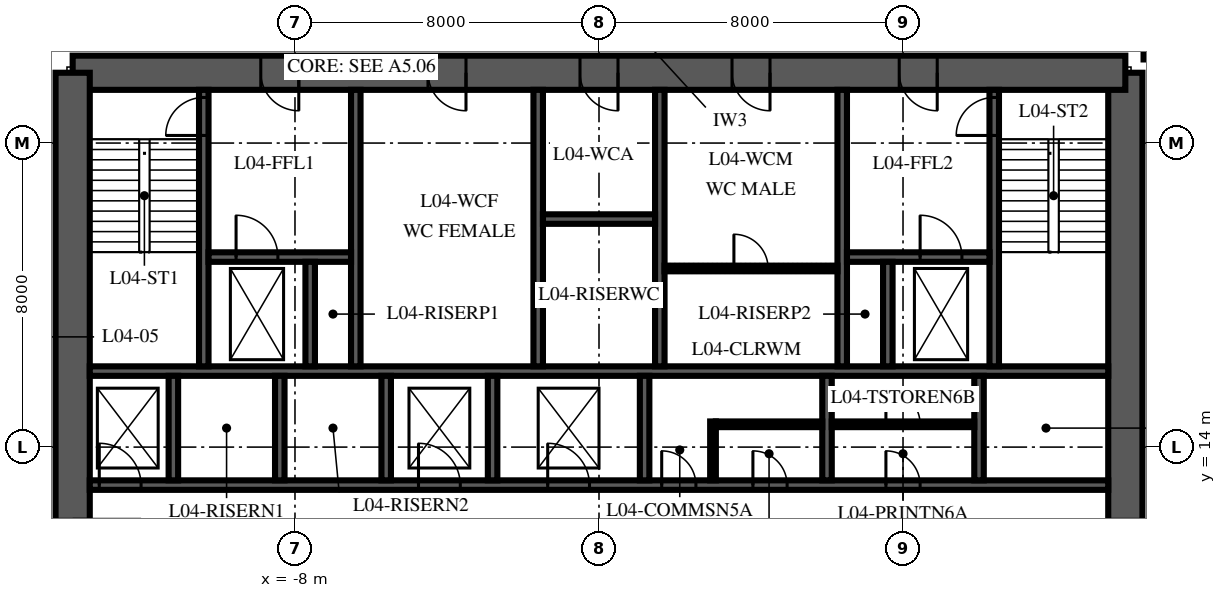
"""IFC4 building model, lengths in metres.
Left out: names, types, materials, properties, quantities, classifications, styles, units other than length and angle.
Written with IfcOpenShell. Run it as: python <this file> out.ifc"""

import sys

from ifc_helpers import new_model, si_unit, direction, frame, frame_2d, origin, place, context, subcontext, project, spatial, polyline, rectangle, outline, extrude, element, fill, save


model = new_model("IFC4")
c1 = context("Model", 3, precision=1e-05, world=origin(), true_north=direction((0.0, 1.0)))
c2 = subcontext(c1, "Body", "Model", "MODEL_VIEW")
j1 = project(units=[si_unit("LENGTHUNIT", "METRE"), si_unit("PLANEANGLEUNIT", "RADIAN")], contexts=[c1])
p1 = place(None, origin())
s1 = spatial("IfcSite", under=j1, at=p1, CompositionType="ELEMENT")
p2 = place(p1, origin())
s2 = spatial("IfcBuilding", under=s1, at=p2, CompositionType="ELEMENT")
p3 = place(p2, frame((0.0, 0.0, 28.0)))
s3 = spatial("IfcBuildingStorey", under=s2, at=p3, CompositionType="ELEMENT", Elevation=28.0)
p4 = place(p3, frame((13.85, 6.15, 0.0), z_axis=(0.0, 0.0, 1.0), x_axis=(0.0, 1.0, 0.0)))
e1 = element("IfcWall", 1, at=p4, inside=s3, PredefinedType="SHEAR", context=c2, shape_type="SweptSolid", body=[
    extrude(outline(polyline([(0.0, -0.45), (17.7, -0.45), (17.7, 0.0), (17.25, 0.0), (17.25, 0.45), (0.45, 0.45), (0.45, 0.0), (0.0, 0.0), (0.0, -0.45)])), origin(), (0.0, 0.0, 1.0), 4.0),
])
p5 = place(p4, frame((4.15, 0.0, 0.0)))
e2 = element("IfcOpeningElement", 2, at=p5, cuts=e1, PredefinedType="OPENING", context=c2, shape_type="SweptSolid", body=[
    extrude(rectangle(XDim=1.8, YDim=2.4, at=frame_2d((0.9, 1.2))), frame((0.0, 0.465, 0.0), z_axis=(0.0, -1.0, 0.0), x_axis=(1.0, 0.0, 0.0)), (0.0, 0.0, 1.0), 0.93),
])
p6 = place(p3, frame((13.85, 23.85, 0.0), z_axis=(0.0, 0.0, 1.0), x_axis=(-1.0, 0.0, 0.0)))
e3 = element("IfcWall", 3, at=p6, inside=s3, PredefinedType="SHEAR", context=c2, shape_type="SweptSolid", body=[
    extrude(rectangle(XDim=27.7, YDim=0.9, at=frame_2d((13.85, 0.0))), origin(), (0.0, 0.0, 1.0), 4.0),
])
p7 = place(p6, frame((21.75, 0.0, 0.0)))
e4 = element("IfcOpeningElement", 4, at=p7, cuts=e3, PredefinedType="OPENING", context=c2, shape_type="SweptSolid", body=[
    extrude(rectangle(XDim=1.0, YDim=2.1, at=frame_2d((0.5, 1.05))), frame((0.0, 0.465, 0.0), z_axis=(0.0, -1.0, 0.0), x_axis=(1.0, 0.0, 0.0)), (0.0, 0.0, 1.0), 0.93),
])
p8 = place(p6, frame((4.95, 0.0, 0.0)))
e5 = element("IfcOpeningElement", 5, at=p8, cuts=e3, PredefinedType="OPENING", context=c2, shape_type="SweptSolid", body=[
    extrude(rectangle(XDim=1.0, YDim=2.1, at=frame_2d((0.5, 1.05))), frame((0.0, 0.465, 0.0), z_axis=(0.0, -1.0, 0.0), x_axis=(1.0, 0.0, 0.0)), (0.0, 0.0, 1.0), 0.93),
])
p9 = place(p6, frame((17.35, 0.0, 0.0)))
e6 = element("IfcOpeningElement", 6, at=p9, cuts=e3, PredefinedType="OPENING", context=c2, shape_type="SweptSolid", body=[
    extrude(rectangle(XDim=1.0, YDim=2.1, at=frame_2d((0.5, 1.05))), frame((0.0, 0.465, 0.0), z_axis=(0.0, -1.0, 0.0), x_axis=(1.0, 0.0, 0.0)), (0.0, 0.0, 1.0), 0.93),
])
p10 = place(p6, frame((13.35, 0.0, 0.0)))
e7 = element("IfcOpeningElement", 7, at=p10, cuts=e3, PredefinedType="OPENING", context=c2, shape_type="SweptSolid", body=[
    extrude(rectangle(XDim=1.0, YDim=2.1, at=frame_2d((0.5, 1.05))), frame((0.0, 0.465, 0.0), z_axis=(0.0, -1.0, 0.0), x_axis=(1.0, 0.0, 0.0)), (0.0, 0.0, 1.0), 0.93),
])
p11 = place(p6, frame((9.35, 0.0, 0.0)))
e8 = element("IfcOpeningElement", 8, at=p11, cuts=e3, PredefinedType="OPENING", context=c2, shape_type="SweptSolid", body=[
    extrude(rectangle(XDim=1.0, YDim=2.1, at=frame_2d((0.5, 1.05))), frame((0.0, 0.465, 0.0), z_axis=(0.0, -1.0, 0.0), x_axis=(1.0, 0.0, 0.0)), (0.0, 0.0, 1.0), 0.93),
])
p12 = place(p3, frame((-13.85, 23.85, 0.0), z_axis=(0.0, 0.0, 1.0), x_axis=(0.0, -1.0, 0.0)))
e9 = element("IfcWall", 9, at=p12, inside=s3, PredefinedType="SHEAR", context=c2, shape_type="SweptSolid", body=[
    extrude(outline(polyline([(0.0, -0.45), (17.7, -0.45), (17.7, 0.0), (17.25, 0.0), (17.25, 0.45), (0.45, 0.45), (0.45, 0.0), (0.0, 0.0), (0.0, -0.45)])), origin(), (0.0, 0.0, 1.0), 4.0),
])
p13 = place(p12, frame((11.75, 0.0, 0.0)))
e10 = element("IfcOpeningElement", 10, at=p13, cuts=e9, PredefinedType="OPENING", context=c2, shape_type="SweptSolid", body=[
    extrude(rectangle(XDim=1.8, YDim=2.4, at=frame_2d((0.9, 1.2))), frame((0.0, 0.465, 0.0), z_axis=(0.0, -1.0, 0.0), x_axis=(1.0, 0.0, 0.0)), (0.0, 0.0, 1.0), 0.93),
])
p14 = place(p3, frame((-13.4, 13.0, 0.0), z_axis=(0.0, 0.0, 1.0), x_axis=(1.0, 0.0, 0.0)))
e11 = element("IfcWall", 11, at=p14, inside=s3, PredefinedType="SHEAR", context=c2, shape_type="SweptSolid", body=[
    extrude(rectangle(XDim=26.8, YDim=0.25, at=frame_2d((13.4, 0.0))), origin(), (0.0, 0.0, 1.0), 4.0),
])
p15 = place(p14, frame((0.25, 0.0, 0.0)))
e12 = element("IfcOpeningElement", 12, at=p15, cuts=e11, PredefinedType="OPENING", context=c2, shape_type="SweptSolid", body=[
    extrude(rectangle(XDim=1.1, YDim=2.1, at=frame_2d((0.55, 1.05))), frame((0.0, 0.14, 0.0), z_axis=(0.0, -1.0, 0.0), x_axis=(1.0, 0.0, 0.0)), (0.0, 0.0, 1.0), 0.28),
])
p16 = place(p14, frame((8.65, 0.0, 0.0)))
e13 = element("IfcOpeningElement", 13, at=p16, cuts=e11, PredefinedType="OPENING", context=c2, shape_type="SweptSolid", body=[
    extrude(rectangle(XDim=1.1, YDim=2.1, at=frame_2d((0.55, 1.05))), frame((0.0, 0.14, 0.0), z_axis=(0.0, -1.0, 0.0), x_axis=(1.0, 0.0, 0.0)), (0.0, 0.0, 1.0), 0.28),
])
p17 = place(p14, frame((12.05, 0.0, 0.0)))
e14 = element("IfcOpeningElement", 14, at=p17, cuts=e11, PredefinedType="OPENING", context=c2, shape_type="SweptSolid", body=[
    extrude(rectangle(XDim=1.1, YDim=2.1, at=frame_2d((0.55, 1.05))), frame((0.0, 0.14, 0.0), z_axis=(0.0, -1.0, 0.0), x_axis=(1.0, 0.0, 0.0)), (0.0, 0.0, 1.0), 0.28),
])
p18 = place(p14, frame((15.05, 0.0, 0.0)))
e15 = element("IfcOpeningElement", 15, at=p18, cuts=e11, PredefinedType="OPENING", context=c2, shape_type="SweptSolid", body=[
    extrude(rectangle(XDim=0.9, YDim=2.1, at=frame_2d((0.45, 1.05))), frame((0.0, 0.14, 0.0), z_axis=(0.0, -1.0, 0.0), x_axis=(1.0, 0.0, 0.0)), (0.0, 0.0, 1.0), 0.28),
])
p19 = place(p14, frame((17.45, 0.0, 0.0)))
e16 = element("IfcOpeningElement", 16, at=p19, cuts=e11, PredefinedType="OPENING", context=c2, shape_type="SweptSolid", body=[
    extrude(rectangle(XDim=0.9, YDim=2.1, at=frame_2d((0.45, 1.05))), frame((0.0, 0.14, 0.0), z_axis=(0.0, -1.0, 0.0), x_axis=(1.0, 0.0, 0.0)), (0.0, 0.0, 1.0), 0.28),
])
p20 = place(p14, frame((20.95, 0.0, 0.0)))
e17 = element("IfcOpeningElement", 17, at=p20, cuts=e11, PredefinedType="OPENING", context=c2, shape_type="SweptSolid", body=[
    extrude(rectangle(XDim=0.9, YDim=2.1, at=frame_2d((0.45, 1.05))), frame((0.0, 0.14, 0.0), z_axis=(0.0, -1.0, 0.0), x_axis=(1.0, 0.0, 0.0)), (0.0, 0.0, 1.0), 0.28),
])
p21 = place(p3, frame((-13.4, 16.0, 0.0), z_axis=(0.0, 0.0, 1.0), x_axis=(1.0, 0.0, 0.0)))
e18 = element("IfcWall", 18, at=p21, inside=s3, PredefinedType="SHEAR", context=c2, shape_type="SweptSolid", body=[
    extrude(rectangle(XDim=26.8, YDim=0.25, at=frame_2d((13.4, 0.0))), origin(), (0.0, 0.0, 1.0), 4.0),
])
for number, where, z_axis, x_axis in (
    (19, (-11.2, 13.125, 0.0), (0.0, 0.0, 1.0), (0.0, 1.0, 0.0)),
    (20, (-8.4, 13.125, 0.0), (0.0, 0.0, 1.0), (0.0, 1.0, 0.0)),
    (21, (-5.6, 13.125, 0.0), (0.0, 0.0, 1.0), (0.0, 1.0, 0.0)),
    (22, (-2.8, 13.125, 0.0), (0.0, 0.0, 1.0), (0.0, 1.0, 0.0)),
    (23, (1.2, 13.125, 0.0), (0.0, 0.0, 1.0), (0.0, 1.0, 0.0)),
    (24, (6.0, 13.125, 0.0), (0.0, 0.0, 1.0), (0.0, 1.0, 0.0)),
    (25, (10.0, 13.125, 0.0), (0.0, 0.0, 1.0), (0.0, 1.0, 0.0)),
):
    element("IfcWall", number, at=place(p3, frame(where, z_axis=z_axis, x_axis=x_axis)), inside=s3, PredefinedType="SHEAR", context=c2, shape_type="SweptSolid", body=[
        extrude(rectangle(XDim=2.75, YDim=0.25, at=frame_2d((1.375, 0.0))), origin(), (0.0, 0.0, 1.0), 4.0),
    ])
p22 = place(p3, frame((-10.4, 16.125, 0.0), z_axis=(0.0, 0.0, 1.0), x_axis=(0.0, 1.0, 0.0)))
e26 = element("IfcWall", 26, at=p22, inside=s3, PredefinedType="SHEAR", context=c2, shape_type="SweptSolid", body=[
    extrude(rectangle(XDim=7.275, YDim=0.25, at=frame_2d((3.637, 0.0))), origin(), (0.0, 0.0, 1.0), 4.0),
])
p23 = place(p22, frame((6.075, 0.0, 0.0)))
e27 = element("IfcOpeningElement", 27, at=p23, cuts=e26, PredefinedType="OPENING", context=c2, shape_type="SweptSolid", body=[
    extrude(rectangle(XDim=1.0, YDim=2.1, at=frame_2d((0.5, 1.05))), frame((0.0, 0.14, 0.0), z_axis=(0.0, -1.0, 0.0), x_axis=(1.0, 0.0, 0.0)), (0.0, 0.0, 1.0), 0.28),
])
for number, where, z_axis, x_axis in (
    (28, (-6.4, 16.125, 0.0), (0.0, 0.0, 1.0), (0.0, 1.0, 0.0)),
    (29, (-1.6, 16.125, 0.0), (0.0, 0.0, 1.0), (0.0, 1.0, 0.0)),
    (30, (1.6, 16.125, 0.0), (0.0, 0.0, 1.0), (0.0, 1.0, 0.0)),
    (31, (6.4, 16.125, 0.0), (0.0, 0.0, 1.0), (0.0, 1.0, 0.0)),
):
    element("IfcWall", number, at=place(p3, frame(where, z_axis=z_axis, x_axis=x_axis)), inside=s3, PredefinedType="SHEAR", context=c2, shape_type="SweptSolid", body=[
        extrude(rectangle(XDim=7.275, YDim=0.25, at=frame_2d((3.637, 0.0))), origin(), (0.0, 0.0, 1.0), 4.0),
    ])
p24 = place(p3, frame((10.4, 16.125, 0.0), z_axis=(0.0, 0.0, 1.0), x_axis=(0.0, 1.0, 0.0)))
e32 = element("IfcWall", 32, at=p24, inside=s3, PredefinedType="SHEAR", context=c2, shape_type="SweptSolid", body=[
    extrude(rectangle(XDim=7.275, YDim=0.25, at=frame_2d((3.637, 0.0))), origin(), (0.0, 0.0, 1.0), 4.0),
])
p25 = place(p24, frame((6.075, 0.0, 0.0)))
e33 = element("IfcOpeningElement", 33, at=p25, cuts=e32, PredefinedType="OPENING", context=c2, shape_type="SweptSolid", body=[
    extrude(rectangle(XDim=1.0, YDim=2.1, at=frame_2d((0.5, 1.05))), frame((0.0, 0.14, 0.0), z_axis=(0.0, -1.0, 0.0), x_axis=(1.0, 0.0, 0.0)), (0.0, 0.0, 1.0), 0.28),
])
p26 = place(p3, frame((-10.275, 19.0, 0.0), z_axis=(0.0, 0.0, 1.0), x_axis=(1.0, 0.0, 0.0)))
e34 = element("IfcWall", 34, at=p26, inside=s3, PredefinedType="SHEAR", context=c2, shape_type="SweptSolid", body=[
    extrude(rectangle(XDim=3.75, YDim=0.25, at=frame_2d((1.875, 0.0))), origin(), (0.0, 0.0, 1.0), 4.0),
])
p27 = place(p26, frame((0.725, 0.0, 0.0)))
e35 = element("IfcOpeningElement", 35, at=p27, cuts=e34, PredefinedType="OPENING", context=c2, shape_type="SweptSolid", body=[
    extrude(rectangle(XDim=1.1, YDim=2.1, at=frame_2d((0.55, 1.05))), frame((0.0, 0.14, 0.0), z_axis=(0.0, -1.0, 0.0), x_axis=(1.0, 0.0, 0.0)), (0.0, 0.0, 1.0), 0.28),
])
p28 = place(p3, frame((6.525, 19.0, 0.0), z_axis=(0.0, 0.0, 1.0), x_axis=(1.0, 0.0, 0.0)))
e36 = element("IfcWall", 36, at=p28, inside=s3, PredefinedType="SHEAR", context=c2, shape_type="SweptSolid", body=[
    extrude(rectangle(XDim=3.75, YDim=0.25, at=frame_2d((1.875, 0.0))), origin(), (0.0, 0.0, 1.0), 4.0),
])
p29 = place(p28, frame((1.925, 0.0, 0.0)))
e37 = element("IfcOpeningElement", 37, at=p29, cuts=e36, PredefinedType="OPENING", context=c2, shape_type="SweptSolid", body=[
    extrude(rectangle(XDim=1.1, YDim=2.1, at=frame_2d((0.55, 1.05))), frame((0.0, 0.14, 0.0), z_axis=(0.0, -1.0, 0.0), x_axis=(1.0, 0.0, 0.0)), (0.0, 0.0, 1.0), 0.28),
])
for number, where, z_axis, x_axis in (
    (38, (-7.6, 16.125, 0.0), (0.0, 0.0, 1.0), (0.0, 1.0, 0.0)),
    (39, (7.6, 16.125, 0.0), (0.0, 0.0, 1.0), (0.0, 1.0, 0.0)),
):
    element("IfcWall", number, at=place(p3, frame(where, z_axis=z_axis, x_axis=x_axis)), inside=s3, PredefinedType="SHEAR", context=c2, shape_type="SweptSolid", body=[
        extrude(rectangle(XDim=2.75, YDim=0.25, at=frame_2d((1.375, 0.0))), origin(), (0.0, 0.0, 1.0), 4.0),
    ])
p30 = place(p3, frame((-1.475, 20.0, 0.0), z_axis=(0.0, 0.0, 1.0), x_axis=(1.0, 0.0, 0.0)))
e40 = element("IfcWall", 40, at=p30, inside=s3, PredefinedType="SHEAR", context=c2, shape_type="SweptSolid", body=[
    extrude(rectangle(XDim=2.95, YDim=0.25, at=frame_2d((1.475, 0.0))), origin(), (0.0, 0.0, 1.0), 4.0),
])
p31 = place(p3, frame((1.725, 18.7, 0.0), z_axis=(0.0, 0.0, 1.0), x_axis=(1.0, 0.0, 0.0)))
e41 = element("IfcWall", 41, at=p31, inside=s3, PredefinedType="PARTITIONING", context=c2, shape_type="SweptSolid", body=[
    extrude(rectangle(XDim=4.55, YDim=0.15, at=frame_2d((2.275, 0.0))), origin(), (0.0, 0.0, 1.0), 3.85),
])
p32 = place(p31, frame((1.825, 0.0, 0.0)))
e42 = element("IfcOpeningElement", 42, at=p32, cuts=e41, PredefinedType="OPENING", context=c2, shape_type="SweptSolid", body=[
    extrude(rectangle(XDim=0.9, YDim=2.1, at=frame_2d((0.45, 1.05))), frame((0.0, 0.09, 0.0), z_axis=(0.0, -1.0, 0.0), x_axis=(1.0, 0.0, 0.0)), (0.0, 0.0, 1.0), 0.18),
])
p33 = place(p3, frame((3.0, 13.125, 0.0), z_axis=(0.0, 0.0, 1.0), x_axis=(0.0, 1.0, 0.0)))
e43 = element("IfcWall", 43, at=p33, inside=s3, PredefinedType="PARTITIONING", context=c2, shape_type="SweptSolid", body=[
    extrude(rectangle(XDim=1.55, YDim=0.15, at=frame_2d((0.775, 0.0))), origin(), (0.0, 0.0, 1.0), 3.85),
])
p34 = place(p3, frame((3.075, 14.6, 0.0), z_axis=(0.0, 0.0, 1.0), x_axis=(1.0, 0.0, 0.0)))
e44 = element("IfcWall", 44, at=p34, inside=s3, PredefinedType="PARTITIONING", context=c2, shape_type="SweptSolid", body=[
    extrude(rectangle(XDim=2.8, YDim=0.15, at=frame_2d((1.4, 0.0))), origin(), (0.0, 0.0, 1.0), 3.85),
])
p35 = place(p3, frame((6.125, 14.6, 0.0), z_axis=(0.0, 0.0, 1.0), x_axis=(1.0, 0.0, 0.0)))
e45 = element("IfcWall", 45, at=p35, inside=s3, PredefinedType="PARTITIONING", context=c2, shape_type="SweptSolid", body=[
    extrude(rectangle(XDim=3.75, YDim=0.15, at=frame_2d((1.875, 0.0))), origin(), (0.0, 0.0, 1.0), 3.85),
])
p36 = place(p35, frame((1.425, 0.0, 0.0)))
e46 = element("IfcOpeningElement", 46, at=p36, cuts=e45, PredefinedType="OPENING", context=c2, shape_type="SweptSolid", body=[
    extrude(rectangle(XDim=0.9, YDim=2.1, at=frame_2d((0.45, 1.05))), frame((0.0, 0.09, 0.0), z_axis=(0.0, -1.0, 0.0), x_axis=(1.0, 0.0, 0.0)), (0.0, 0.0, 1.0), 0.18),
])
p37 = place(p3, frame((14.33, 24.3, 0.0), z_axis=(0.0, 0.0, 1.0), x_axis=(1.0, 0.0, 0.0)))
e47 = element("IfcWall", 47, at=p37, inside=s3, PredefinedType="PARTITIONING", context=c2, shape_type="SweptSolid", body=[
    extrude(rectangle(XDim=1.77, YDim=0.2, at=frame_2d((0.885, 0.0))), origin(), (0.0, 0.0, 1.0), 3.4),
])
p38 = place(p7, origin())
e48 = element("IfcDoor", 48, at=p38, inside=s3, OperationType="SINGLE_SWING_RIGHT", PredefinedType="DOOR", context=c2, shape_type="SweptSolid", body=[
    extrude(rectangle(XDim=1.0, YDim=2.1, at=frame_2d((0.5, 1.05))), frame((0.0, 0.45, 0.0), z_axis=(0.0, -1.0, 0.0), x_axis=(1.0, 0.0, 0.0)), (0.0, 0.0, 1.0), 0.899),
])
fill(e4, e48)
p39 = place(p8, origin())
e49 = element("IfcDoor", 49, at=p39, inside=s3, OperationType="SINGLE_SWING_RIGHT", PredefinedType="DOOR", context=c2, shape_type="SweptSolid", body=[
    extrude(rectangle(XDim=1.0, YDim=2.1, at=frame_2d((0.5, 1.05))), frame((0.0, 0.45, 0.0), z_axis=(0.0, -1.0, 0.0), x_axis=(1.0, 0.0, 0.0)), (0.0, 0.0, 1.0), 0.899),
])
fill(e5, e49)
p40 = place(p9, origin())
e50 = element("IfcDoor", 50, at=p40, inside=s3, OperationType="SINGLE_SWING_LEFT", PredefinedType="DOOR", context=c2, shape_type="SweptSolid", body=[
    extrude(rectangle(XDim=1.0, YDim=2.1, at=frame_2d((0.5, 1.05))), frame((0.0, 0.45, 0.0), z_axis=(0.0, -1.0, 0.0), x_axis=(1.0, 0.0, 0.0)), (0.0, 0.0, 1.0), 0.899),
])
fill(e6, e50)
p41 = place(p10, origin())
e51 = element("IfcDoor", 51, at=p41, inside=s3, OperationType="SINGLE_SWING_LEFT", PredefinedType="DOOR", context=c2, shape_type="SweptSolid", body=[
    extrude(rectangle(XDim=1.0, YDim=2.1, at=frame_2d((0.5, 1.05))), frame((0.0, 0.45, 0.0), z_axis=(0.0, -1.0, 0.0), x_axis=(1.0, 0.0, 0.0)), (0.0, 0.0, 1.0), 0.899),
])
fill(e7, e51)
p42 = place(p11, origin())
e52 = element("IfcDoor", 52, at=p42, inside=s3, OperationType="SINGLE_SWING_LEFT", PredefinedType="DOOR", context=c2, shape_type="SweptSolid", body=[
    extrude(rectangle(XDim=1.0, YDim=2.1, at=frame_2d((0.5, 1.05))), frame((0.0, 0.45, 0.0), z_axis=(0.0, -1.0, 0.0), x_axis=(1.0, 0.0, 0.0)), (0.0, 0.0, 1.0), 0.899),
])
fill(e8, e52)
p43 = place(p23, origin())
e53 = element("IfcDoor", 53, at=p43, inside=s3, OperationType="SINGLE_SWING_LEFT", PredefinedType="DOOR", context=c2, shape_type="SweptSolid", body=[
    extrude(rectangle(XDim=1.0, YDim=2.1, at=frame_2d((0.5, 1.05))), frame((0.0, 0.125, 0.0), z_axis=(0.0, -1.0, 0.0), x_axis=(1.0, 0.0, 0.0)), (0.0, 0.0, 1.0), 0.25),
])
fill(e27, e53)
p44 = place(p25, origin())
e54 = element("IfcDoor", 54, at=p44, inside=s3, OperationType="SINGLE_SWING_LEFT", PredefinedType="DOOR", context=c2, shape_type="SweptSolid", body=[
    extrude(rectangle(XDim=1.0, YDim=2.1, at=frame_2d((0.5, 1.05))), frame((0.0, 0.125, 0.0), z_axis=(0.0, -1.0, 0.0), x_axis=(1.0, 0.0, 0.0)), (0.0, 0.0, 1.0), 0.25),
])
fill(e33, e54)
p45 = place(p15, origin())
e55 = element("IfcDoor", 55, at=p45, inside=s3, OperationType="SLIDING_TO_LEFT", PredefinedType="DOOR", context=c2, shape_type="SweptSolid", body=[
    extrude(rectangle(XDim=1.1, YDim=2.1, at=frame_2d((0.55, 1.05))), frame((0.0, 0.125, 0.0), z_axis=(0.0, -1.0, 0.0), x_axis=(1.0, 0.0, 0.0)), (0.0, 0.0, 1.0), 0.25),
])
fill(e12, e55)
p46 = place(p16, origin())
e56 = element("IfcDoor", 56, at=p46, inside=s3, OperationType="SLIDING_TO_LEFT", PredefinedType="DOOR", context=c2, shape_type="SweptSolid", body=[
    extrude(rectangle(XDim=1.1, YDim=2.1, at=frame_2d((0.55, 1.05))), frame((0.0, 0.125, 0.0), z_axis=(0.0, -1.0, 0.0), x_axis=(1.0, 0.0, 0.0)), (0.0, 0.0, 1.0), 0.25),
])
fill(e13, e56)
p47 = place(p17, origin())
e57 = element("IfcDoor", 57, at=p47, inside=s3, OperationType="SLIDING_TO_LEFT", PredefinedType="DOOR", context=c2, shape_type="SweptSolid", body=[
    extrude(rectangle(XDim=1.1, YDim=2.1, at=frame_2d((0.55, 1.05))), frame((0.0, 0.125, 0.0), z_axis=(0.0, -1.0, 0.0), x_axis=(1.0, 0.0, 0.0)), (0.0, 0.0, 1.0), 0.25),
])
fill(e14, e57)
p48 = place(p29, origin())
e58 = element("IfcDoor", 58, at=p48, inside=s3, OperationType="SLIDING_TO_RIGHT", PredefinedType="DOOR", context=c2, shape_type="SweptSolid", body=[
    extrude(rectangle(XDim=1.1, YDim=2.1, at=frame_2d((0.55, 1.05))), frame((0.0, 0.125, 0.0), z_axis=(0.0, -1.0, 0.0), x_axis=(1.0, 0.0, 0.0)), (0.0, 0.0, 1.0), 0.25),
])
fill(e37, e58)
p49 = place(p27, origin())
e59 = element("IfcDoor", 59, at=p49, inside=s3, OperationType="SLIDING_TO_RIGHT", PredefinedType="DOOR", context=c2, shape_type="SweptSolid", body=[
    extrude(rectangle(XDim=1.1, YDim=2.1, at=frame_2d((0.55, 1.05))), frame((0.0, 0.125, 0.0), z_axis=(0.0, -1.0, 0.0), x_axis=(1.0, 0.0, 0.0)), (0.0, 0.0, 1.0), 0.25),
])
fill(e35, e59)
p50 = place(p18, origin())
e60 = element("IfcDoor", 60, at=p50, inside=s3, OperationType="SINGLE_SWING_LEFT", PredefinedType="DOOR", context=c2, shape_type="SweptSolid", body=[
    extrude(rectangle(XDim=0.9, YDim=2.1, at=frame_2d((0.45, 1.05))), frame((0.0, 0.125, 0.0), z_axis=(0.0, -1.0, 0.0), x_axis=(1.0, 0.0, 0.0)), (0.0, 0.0, 1.0), 0.25),
])
fill(e15, e60)
p51 = place(p19, origin())
e61 = element("IfcDoor", 61, at=p51, inside=s3, OperationType="SINGLE_SWING_LEFT", PredefinedType="DOOR", context=c2, shape_type="SweptSolid", body=[
    extrude(rectangle(XDim=0.9, YDim=2.1, at=frame_2d((0.45, 1.05))), frame((0.0, 0.125, 0.0), z_axis=(0.0, -1.0, 0.0), x_axis=(1.0, 0.0, 0.0)), (0.0, 0.0, 1.0), 0.25),
])
fill(e16, e61)
p52 = place(p20, origin())
e62 = element("IfcDoor", 62, at=p52, inside=s3, OperationType="SINGLE_SWING_LEFT", PredefinedType="DOOR", context=c2, shape_type="SweptSolid", body=[
    extrude(rectangle(XDim=0.9, YDim=2.1, at=frame_2d((0.45, 1.05))), frame((0.0, 0.125, 0.0), z_axis=(0.0, -1.0, 0.0), x_axis=(1.0, 0.0, 0.0)), (0.0, 0.0, 1.0), 0.25),
])
fill(e17, e62)
p53 = place(p36, origin())
e63 = element("IfcDoor", 63, at=p53, inside=s3, OperationType="SINGLE_SWING_LEFT", PredefinedType="DOOR", context=c2, shape_type="SweptSolid", body=[
    extrude(rectangle(XDim=0.9, YDim=2.1, at=frame_2d((0.45, 1.05))), frame((0.0, 0.075, 0.0), z_axis=(0.0, -1.0, 0.0), x_axis=(1.0, 0.0, 0.0)), (0.0, 0.0, 1.0), 0.149),
])
fill(e46, e63)
p54 = place(p32, origin())
e64 = element("IfcDoor", 64, at=p54, inside=s3, OperationType="SINGLE_SWING_LEFT", PredefinedType="DOOR", context=c2, shape_type="SweptSolid", body=[
    extrude(rectangle(XDim=0.9, YDim=2.1, at=frame_2d((0.45, 1.05))), frame((0.0, 0.075, 0.0), z_axis=(0.0, -1.0, 0.0), x_axis=(1.0, 0.0, 0.0)), (0.0, 0.0, 1.0), 0.149),
])
fill(e42, e64)
save(model, sys.argv[1])
